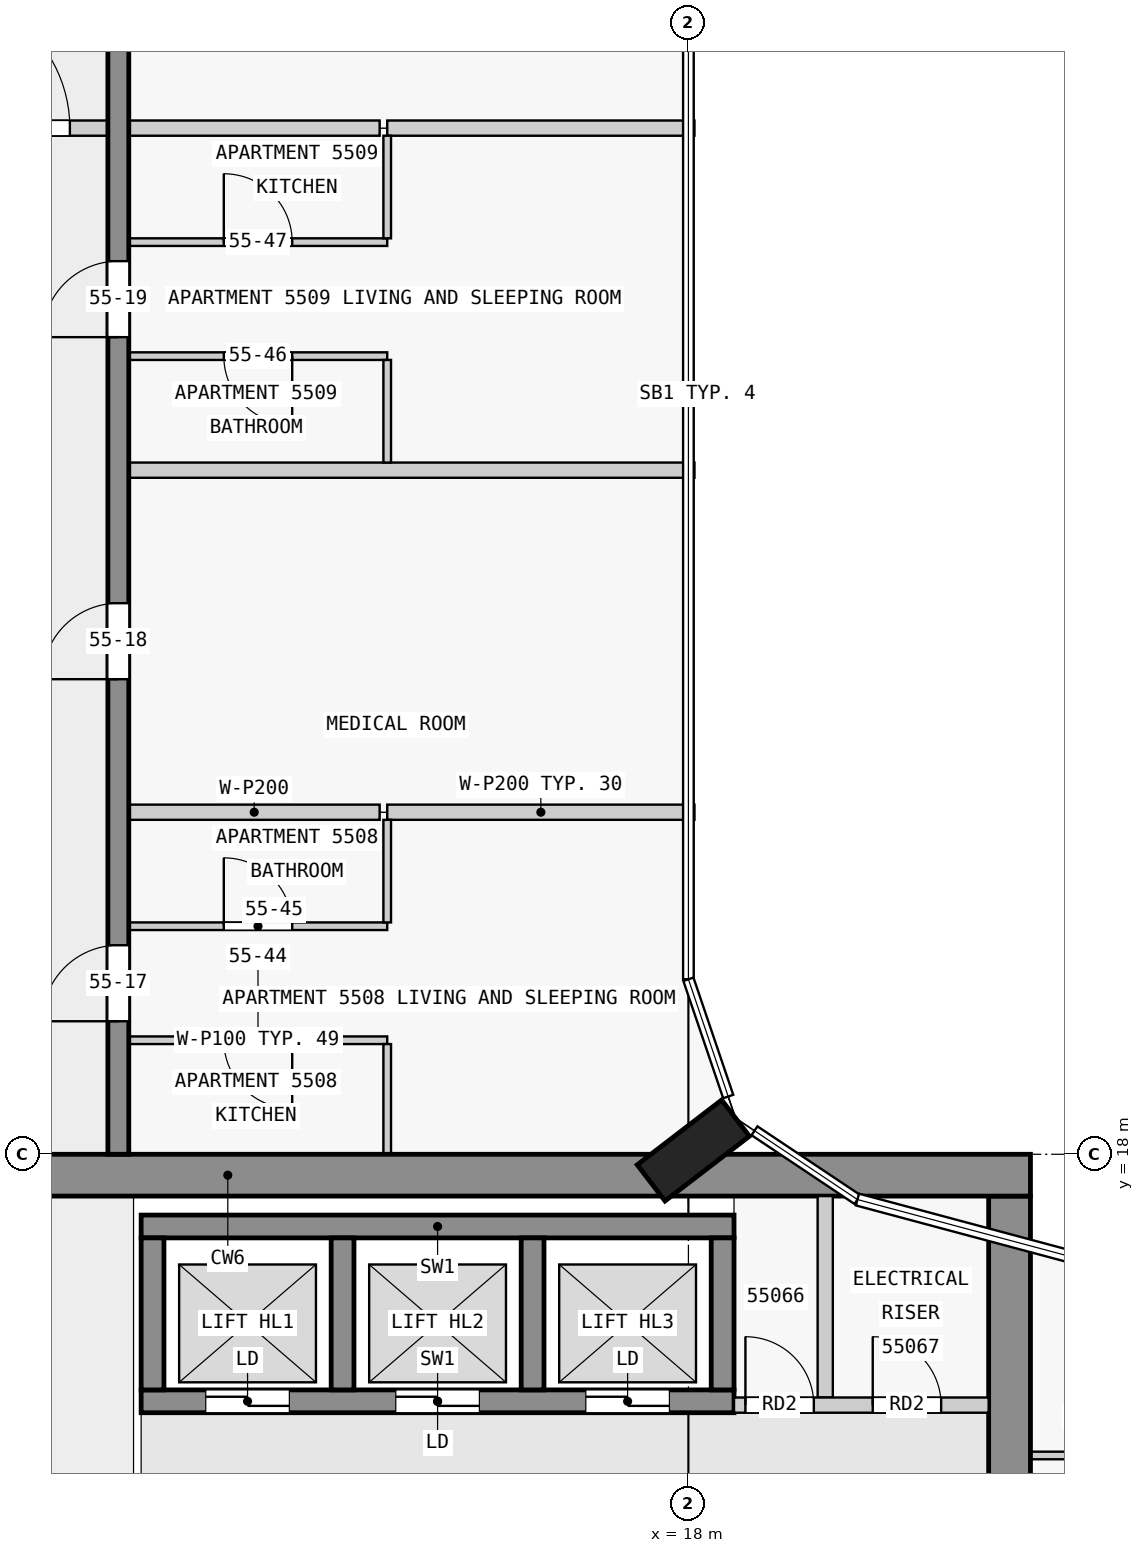
"""IFC4 building model, lengths in metres.
Left out: names, types, materials, properties, quantities, classifications, styles, units other than length and angle.
Written with IfcOpenShell. Run it as: python <this file> out.ifc"""

import sys

from ifc_helpers import new_model, si_unit, direction, frame, frame_2d, origin, origin_2d, place, context, subcontext, project, spatial, rectangle, extrude, element, fill, save


model = new_model("IFC4")
c1 = context("Model", 3, precision=1e-05, world=origin(), true_north=direction((0.0, 1.0)))
c2 = subcontext(c1, "Body", "Model", "MODEL_VIEW")
j1 = project(units=[si_unit("LENGTHUNIT", "METRE"), si_unit("PLANEANGLEUNIT", "RADIAN")], contexts=[c1])
p1 = place(None, origin())
s1 = spatial("IfcSite", under=j1, at=p1, CompositionType="ELEMENT")
p2 = place(p1, origin())
s2 = spatial("IfcBuilding", under=s1, at=p2, CompositionType="ELEMENT")
p3 = place(p2, frame((0.0, 0.0, 211.9)))
s3 = spatial("IfcBuildingStorey", under=s2, at=p3, CompositionType="ELEMENT", Elevation=211.9)
p4 = place(p3, frame((18.065, 18.05, 0.0), z_axis=(0.0, 0.0, 1.0), x_axis=(-0.608810846443, 0.793315418515, 0.0)))
e1 = element("IfcColumn", 1, at=p4, inside=s3, PredefinedType="COLUMN", context=c2, shape_type="SweptSolid", body=[
    extrude(rectangle(XDim=0.6, YDim=1.4, at=origin_2d()), origin(), (0.0, 0.0, 1.0), 3.5),
])
p5 = place(p3, frame((1.38, 17.725, 0.0), z_axis=(0.0, 0.0, 1.0), x_axis=(1.0, 0.0, 0.0)))
e2 = element("IfcWall", 2, at=p5, inside=s3, PredefinedType="SHEAR", context=c2, shape_type="SweptSolid", body=[
    extrude(rectangle(XDim=21.12, YDim=0.55, at=frame_2d((10.56, 0.0))), origin(), (0.0, 0.0, 1.0), 3.25),
])
p6 = place(p5, frame((6.35, 0.0, 0.0)))
e3 = element("IfcOpeningElement", 3, at=p6, cuts=e2, PredefinedType="OPENING", context=c2, shape_type="SweptSolid", body=[
    extrude(rectangle(XDim=1.8, YDim=2.1, at=frame_2d((0.9, 1.05))), frame((0.0, 0.285, 0.0), z_axis=(0.0, -1.0, 0.0), x_axis=(1.0, 0.0, 0.0)), (0.0, 0.0, 1.0), 0.57),
])
p7 = place(p3, frame((22.225, 2.5, 0.0), z_axis=(0.0, 0.0, 1.0), x_axis=(0.0, 1.0, 0.0)))
e4 = element("IfcWall", 4, at=p7, inside=s3, PredefinedType="SHEAR", context=c2, shape_type="SweptSolid", body=[
    extrude(rectangle(XDim=14.95, YDim=0.55, at=frame_2d((7.475, 0.0))), origin(), (0.0, 0.0, 1.0), 3.25),
])
p8 = place(p7, frame((5.6, 0.0, 0.0)))
e5 = element("IfcOpeningElement", 5, at=p8, cuts=e4, PredefinedType="OPENING", context=c2, shape_type="SweptSolid", body=[
    extrude(rectangle(XDim=1.8, YDim=2.1, at=frame_2d((0.9, 1.05))), frame((0.0, 0.285, 0.0), z_axis=(0.0, -1.0, 0.0), x_axis=(1.0, 0.0, 0.0)), (0.0, 0.0, 1.0), 0.57),
])
p9 = place(p3, frame((10.8, 17.05, 0.0), z_axis=(0.0, 0.0, 1.0), x_axis=(1.0, 0.0, 0.0)))
e6 = element("IfcWall", 6, at=p9, inside=s3, PredefinedType="SHEAR", context=c2, shape_type="SweptSolid", body=[
    extrude(rectangle(XDim=7.8, YDim=0.3, at=frame_2d((3.9, 0.0))), origin(), (0.0, 0.0, 1.0), 3.25),
])
p10 = place(p3, frame((10.8, 14.75, 0.0), z_axis=(0.0, 0.0, 1.0), x_axis=(1.0, 0.0, 0.0)))
e7 = element("IfcWall", 7, at=p10, inside=s3, PredefinedType="SHEAR", context=c2, shape_type="SweptSolid", body=[
    extrude(rectangle(XDim=7.8, YDim=0.3, at=frame_2d((3.9, 0.0))), origin(), (0.0, 0.0, 1.0), 3.25),
])
p11 = place(p10, frame((0.85, 0.0, 0.0)))
e8 = element("IfcOpeningElement", 8, at=p11, cuts=e7, PredefinedType="OPENING", context=c2, shape_type="SweptSolid", body=[
    extrude(rectangle(XDim=1.1, YDim=2.1, at=frame_2d((0.55, 1.05))), frame((0.0, 0.16, 0.0), z_axis=(0.0, -1.0, 0.0), x_axis=(1.0, 0.0, 0.0)), (0.0, 0.0, 1.0), 0.32),
])
p12 = place(p10, frame((3.35, 0.0, 0.0)))
e9 = element("IfcOpeningElement", 9, at=p12, cuts=e7, PredefinedType="OPENING", context=c2, shape_type="SweptSolid", body=[
    extrude(rectangle(XDim=1.1, YDim=2.1, at=frame_2d((0.55, 1.05))), frame((0.0, 0.16, 0.0), z_axis=(0.0, -1.0, 0.0), x_axis=(1.0, 0.0, 0.0)), (0.0, 0.0, 1.0), 0.32),
])
p13 = place(p10, frame((5.85, 0.0, 0.0)))
e10 = element("IfcOpeningElement", 10, at=p13, cuts=e7, PredefinedType="OPENING", context=c2, shape_type="SweptSolid", body=[
    extrude(rectangle(XDim=1.1, YDim=2.1, at=frame_2d((0.55, 1.05))), frame((0.0, 0.16, 0.0), z_axis=(0.0, -1.0, 0.0), x_axis=(1.0, 0.0, 0.0)), (0.0, 0.0, 1.0), 0.32),
])
for number, where, z_axis, x_axis in (
    (11, (10.95, 14.9, 0.0), (0.0, 0.0, 1.0), (0.0, 1.0, 0.0)),
    (12, (13.45, 14.9, 0.0), (0.0, 0.0, 1.0), (0.0, 1.0, 0.0)),
    (13, (15.95, 14.9, 0.0), (0.0, 0.0, 1.0), (0.0, 1.0, 0.0)),
    (14, (18.45, 14.9, 0.0), (0.0, 0.0, 1.0), (0.0, 1.0, 0.0)),
):
    element("IfcWall", number, at=place(p3, frame(where, z_axis=z_axis, x_axis=x_axis)), inside=s3, PredefinedType="SHEAR", context=c2, shape_type="SweptSolid", body=[
        extrude(rectangle(XDim=2.0, YDim=0.3, at=frame_2d((1.0, 0.0))), origin(), (0.0, 0.0, 1.0), 3.25),
    ])
p14 = place(p3, frame((10.5, 18.0, 0.0), z_axis=(0.0, 0.0, 1.0), x_axis=(0.0, 1.0, 0.0)))
e15 = element("IfcWall", 15, at=p14, inside=s3, PredefinedType="SHEAR", context=c2, shape_type="SweptSolid", body=[
    extrude(rectangle(XDim=27.0, YDim=0.275, at=frame_2d((13.5, 0.0))), origin(), (0.0, 0.0, 1.0), 3.25),
])
p15 = place(p14, frame((1.75, 0.0, 0.0)))
e16 = element("IfcOpeningElement", 16, at=p15, cuts=e15, PredefinedType="OPENING", context=c2, shape_type="SweptSolid", body=[
    extrude(rectangle(XDim=1.0, YDim=2.1, at=frame_2d((0.5, 1.05))), frame((0.0, 0.147, 0.0), z_axis=(0.0, -1.0, 0.0), x_axis=(1.0, 0.0, 0.0)), (0.0, 0.0, 1.0), 0.295),
])
p16 = place(p14, frame((6.25, 0.0, 0.0)))
e17 = element("IfcOpeningElement", 17, at=p16, cuts=e15, PredefinedType="OPENING", context=c2, shape_type="SweptSolid", body=[
    extrude(rectangle(XDim=1.0, YDim=2.1, at=frame_2d((0.5, 1.05))), frame((0.0, 0.147, 0.0), z_axis=(0.0, -1.0, 0.0), x_axis=(1.0, 0.0, 0.0)), (0.0, 0.0, 1.0), 0.295),
])
p17 = place(p14, frame((10.75, 0.0, 0.0)))
e18 = element("IfcOpeningElement", 18, at=p17, cuts=e15, PredefinedType="OPENING", context=c2, shape_type="SweptSolid", body=[
    extrude(rectangle(XDim=1.0, YDim=2.1, at=frame_2d((0.5, 1.05))), frame((0.0, 0.147, 0.0), z_axis=(0.0, -1.0, 0.0), x_axis=(1.0, 0.0, 0.0)), (0.0, 0.0, 1.0), 0.295),
])
p18 = place(p14, frame((15.25, 0.0, 0.0)))
e19 = element("IfcOpeningElement", 19, at=p18, cuts=e15, PredefinedType="OPENING", context=c2, shape_type="SweptSolid", body=[
    extrude(rectangle(XDim=1.0, YDim=2.1, at=frame_2d((0.5, 1.05))), frame((0.0, 0.147, 0.0), z_axis=(0.0, -1.0, 0.0), x_axis=(1.0, 0.0, 0.0)), (0.0, 0.0, 1.0), 0.295),
])
p19 = place(p14, frame((21.35, 0.0, 0.0)))
e20 = element("IfcOpeningElement", 20, at=p19, cuts=e15, PredefinedType="OPENING", context=c2, shape_type="SweptSolid", body=[
    extrude(rectangle(XDim=1.0, YDim=2.1, at=frame_2d((0.5, 1.05))), frame((0.0, 0.147, 0.0), z_axis=(0.0, -1.0, 0.0), x_axis=(1.0, 0.0, 0.0)), (0.0, 0.0, 1.0), 0.295),
])
p20 = place(p3, frame((18.6, 14.7, 0.0), z_axis=(0.0, 0.0, 1.0), x_axis=(1.0, 0.0, 0.0)))
e21 = element("IfcWall", 21, at=p20, inside=s3, PredefinedType="PARTITIONING", context=c2, shape_type="SweptSolid", body=[
    extrude(rectangle(XDim=3.35, YDim=0.2, at=frame_2d((1.675, 0.0))), origin(), (0.0, 0.0, 1.0), 3.25),
])
p21 = place(p20, frame((0.15, 0.0, 0.0)))
e22 = element("IfcOpeningElement", 22, at=p21, cuts=e21, PredefinedType="OPENING", context=c2, shape_type="SweptSolid", body=[
    extrude(rectangle(XDim=0.9, YDim=2.1, at=frame_2d((0.45, 1.05))), frame((0.0, 0.11, 0.0), z_axis=(0.0, -1.0, 0.0), x_axis=(1.0, 0.0, 0.0)), (0.0, 0.0, 1.0), 0.22),
])
p22 = place(p20, frame((1.825, 0.0, 0.0)))
e23 = element("IfcOpeningElement", 23, at=p22, cuts=e21, PredefinedType="OPENING", context=c2, shape_type="SweptSolid", body=[
    extrude(rectangle(XDim=0.9, YDim=2.1, at=frame_2d((0.45, 1.05))), frame((0.0, 0.11, 0.0), z_axis=(0.0, -1.0, 0.0), x_axis=(1.0, 0.0, 0.0)), (0.0, 0.0, 1.0), 0.22),
])
p23 = place(p3, frame((19.8, 14.8, 0.0), z_axis=(0.0, 0.0, 1.0), x_axis=(0.0, 1.0, 0.0)))
e24 = element("IfcWall", 24, at=p23, inside=s3, PredefinedType="PARTITIONING", context=c2, shape_type="SweptSolid", body=[
    extrude(rectangle(XDim=2.65, YDim=0.2, at=frame_2d((1.325, 0.0))), origin(), (0.0, 0.0, 1.0), 3.25),
])
p24 = place(p3, frame((23.95, 14.038, 0.0), z_axis=(0.0, 0.0, 1.0), x_axis=(-1.0, 0.0, 0.0)))
e25 = element("IfcWall", 25, at=p24, inside=s3, PredefinedType="PARTITIONING", context=c2, shape_type="SweptSolid", body=[
    extrude(rectangle(XDim=1.45, YDim=0.1, at=frame_2d((0.725, 0.0))), origin(), (0.0, 0.0, 1.0), 3.25),
])
p25 = place(p3, frame((14.038, 19.5, 0.0), z_axis=(0.0, 0.0, 1.0), x_axis=(-1.0, 0.0, 0.0)))
e26 = element("IfcWall", 26, at=p25, inside=s3, PredefinedType="PARTITIONING", context=c2, shape_type="SweptSolid", body=[
    extrude(rectangle(XDim=3.4, YDim=0.1, at=frame_2d((1.7, 0.0))), origin(), (0.0, 0.0, 1.0), 3.25),
])
p26 = place(p25, frame((1.25, 0.0, 0.0)))
e27 = element("IfcOpeningElement", 27, at=p26, cuts=e26, PredefinedType="OPENING", context=c2, shape_type="SweptSolid", body=[
    extrude(rectangle(XDim=0.9, YDim=2.1, at=frame_2d((0.45, 1.05))), frame((0.0, 0.06, 0.0), z_axis=(0.0, -1.0, 0.0), x_axis=(1.0, 0.0, 0.0)), (0.0, 0.0, 1.0), 0.12),
])
p27 = place(p3, frame((10.637, 21.0, 0.0), z_axis=(0.0, 0.0, 1.0), x_axis=(1.0, 0.0, 0.0)))
e28 = element("IfcWall", 28, at=p27, inside=s3, PredefinedType="PARTITIONING", context=c2, shape_type="SweptSolid", body=[
    extrude(rectangle(XDim=3.4, YDim=0.1, at=frame_2d((1.7, 0.0))), origin(), (0.0, 0.0, 1.0), 3.25),
])
p28 = place(p27, frame((1.25, 0.0, 0.0)))
e29 = element("IfcOpeningElement", 29, at=p28, cuts=e28, PredefinedType="OPENING", context=c2, shape_type="SweptSolid", body=[
    extrude(rectangle(XDim=0.9, YDim=2.1, at=frame_2d((0.45, 1.05))), frame((0.0, 0.06, 0.0), z_axis=(0.0, -1.0, 0.0), x_axis=(1.0, 0.0, 0.0)), (0.0, 0.0, 1.0), 0.12),
])
p29 = place(p3, frame((13.938, 22.5, 0.0), z_axis=(0.0, 0.0, 1.0), x_axis=(-1.0, 0.0, 0.0)))
e30 = element("IfcWall", 30, at=p29, inside=s3, PredefinedType="PARTITIONING", context=c2, shape_type="SweptSolid", body=[
    extrude(rectangle(XDim=3.3, YDim=0.2, at=frame_2d((1.65, 0.0))), origin(), (0.0, 0.0, 1.0), 3.25),
])
p30 = place(p3, frame((14.038, 22.5, 0.0), z_axis=(0.0, 0.0, 1.0), x_axis=(1.0, 0.0, 0.0)))
e31 = element("IfcWall", 31, at=p30, inside=s3, PredefinedType="PARTITIONING", context=c2, shape_type="SweptSolid", body=[
    extrude(rectangle(XDim=4.042, YDim=0.2, at=frame_2d((2.021, 0.0))), origin(), (0.0, 0.0, 1.0), 3.25),
])
p31 = place(p3, frame((18.08, 27.0, 0.0), z_axis=(0.0, 0.0, 1.0), x_axis=(-1.0, 0.0, 0.0)))
e32 = element("IfcWall", 32, at=p31, inside=s3, PredefinedType="PARTITIONING", context=c2, shape_type="SweptSolid", body=[
    extrude(rectangle(XDim=7.443, YDim=0.2, at=frame_2d((3.721, 0.0))), origin(), (0.0, 0.0, 1.0), 3.25),
])
p32 = place(p3, frame((14.038, 28.5, 0.0), z_axis=(0.0, 0.0, 1.0), x_axis=(-1.0, 0.0, 0.0)))
e33 = element("IfcWall", 33, at=p32, inside=s3, PredefinedType="PARTITIONING", context=c2, shape_type="SweptSolid", body=[
    extrude(rectangle(XDim=3.4, YDim=0.1, at=frame_2d((1.7, 0.0))), origin(), (0.0, 0.0, 1.0), 3.25),
])
p33 = place(p32, frame((1.25, 0.0, 0.0)))
e34 = element("IfcOpeningElement", 34, at=p33, cuts=e33, PredefinedType="OPENING", context=c2, shape_type="SweptSolid", body=[
    extrude(rectangle(XDim=0.9, YDim=2.1, at=frame_2d((0.45, 1.05))), frame((0.0, 0.06, 0.0), z_axis=(0.0, -1.0, 0.0), x_axis=(1.0, 0.0, 0.0)), (0.0, 0.0, 1.0), 0.12),
])
p34 = place(p3, frame((10.637, 30.0, 0.0), z_axis=(0.0, 0.0, 1.0), x_axis=(1.0, 0.0, 0.0)))
e35 = element("IfcWall", 35, at=p34, inside=s3, PredefinedType="PARTITIONING", context=c2, shape_type="SweptSolid", body=[
    extrude(rectangle(XDim=3.4, YDim=0.1, at=frame_2d((1.7, 0.0))), origin(), (0.0, 0.0, 1.0), 3.25),
])
p35 = place(p34, frame((1.25, 0.0, 0.0)))
e36 = element("IfcOpeningElement", 36, at=p35, cuts=e35, PredefinedType="OPENING", context=c2, shape_type="SweptSolid", body=[
    extrude(rectangle(XDim=0.9, YDim=2.1, at=frame_2d((0.45, 1.05))), frame((0.0, 0.06, 0.0), z_axis=(0.0, -1.0, 0.0), x_axis=(1.0, 0.0, 0.0)), (0.0, 0.0, 1.0), 0.12),
])
p36 = place(p3, frame((13.938, 31.5, 0.0), z_axis=(0.0, 0.0, 1.0), x_axis=(-1.0, 0.0, 0.0)))
e37 = element("IfcWall", 37, at=p36, inside=s3, PredefinedType="PARTITIONING", context=c2, shape_type="SweptSolid", body=[
    extrude(rectangle(XDim=3.3, YDim=0.2, at=frame_2d((1.65, 0.0))), origin(), (0.0, 0.0, 1.0), 3.25),
])
p37 = place(p3, frame((14.038, 31.5, 0.0), z_axis=(0.0, 0.0, 1.0), x_axis=(1.0, 0.0, 0.0)))
e38 = element("IfcWall", 38, at=p37, inside=s3, PredefinedType="PARTITIONING", context=c2, shape_type="SweptSolid", body=[
    extrude(rectangle(XDim=4.042, YDim=0.2, at=frame_2d((2.021, 0.0))), origin(), (0.0, 0.0, 1.0), 3.25),
])
p38 = place(p3, frame((14.038, 18.0, 0.0), z_axis=(0.0, 0.0, 1.0), x_axis=(0.0, 1.0, 0.0)))
e39 = element("IfcWall", 39, at=p38, inside=s3, PredefinedType="PARTITIONING", context=c2, shape_type="SweptSolid", body=[
    extrude(rectangle(XDim=1.45, YDim=0.1, at=frame_2d((0.725, 0.0))), origin(), (0.0, 0.0, 1.0), 3.25),
])
for number, where, z_axis, x_axis in (
    (40, (14.038, 21.05, 0.0), (0.0, 0.0, 1.0), (0.0, 1.0, 0.0)),
    (41, (14.038, 27.1, 0.0), (0.0, 0.0, 1.0), (0.0, 1.0, 0.0)),
    (42, (14.038, 30.05, 0.0), (0.0, 0.0, 1.0), (0.0, 1.0, 0.0)),
):
    element("IfcWall", number, at=place(p3, frame(where, z_axis=z_axis, x_axis=x_axis)), inside=s3, PredefinedType="PARTITIONING", context=c2, shape_type="SweptSolid", body=[
        extrude(rectangle(XDim=1.35, YDim=0.1, at=frame_2d((0.675, 0.0))), origin(), (0.0, 0.0, 1.0), 3.25),
    ])
p39 = place(p3, frame((7.462, 31.5, 0.0), z_axis=(0.0, 0.0, 1.0), x_axis=(1.0, 0.0, 0.0)))
e43 = element("IfcWall", 43, at=p39, inside=s3, PredefinedType="PARTITIONING", context=c2, shape_type="SweptSolid", body=[
    extrude(rectangle(XDim=3.075, YDim=0.2, at=frame_2d((1.538, 0.0))), origin(), (0.0, 0.0, 1.0), 3.25),
])
p40 = place(p39, frame((0.6, 0.0, 0.0)))
e44 = element("IfcOpeningElement", 44, at=p40, cuts=e43, PredefinedType="OPENING", context=c2, shape_type="SweptSolid", body=[
    extrude(rectangle(XDim=1.8, YDim=2.1, at=frame_2d((0.9, 1.05))), frame((0.0, 0.11, 0.0), z_axis=(0.0, -1.0, 0.0), x_axis=(1.0, 0.0, 0.0)), (0.0, 0.0, 1.0), 0.22),
])
p41 = place(p11, origin())
e45 = element("IfcDoor", 45, at=p41, inside=s3, OperationType="DOUBLE_DOOR_SLIDING", PredefinedType="DOOR", context=c2, shape_type="SweptSolid", body=[
    extrude(rectangle(XDim=1.1, YDim=2.1, at=frame_2d((0.55, 1.05))), frame((0.0, 0.025, 0.0), z_axis=(0.0, -1.0, 0.0), x_axis=(1.0, 0.0, 0.0)), (0.0, 0.0, 1.0), 0.05),
])
fill(e8, e45)
p42 = place(p12, origin())
e46 = element("IfcDoor", 46, at=p42, inside=s3, OperationType="DOUBLE_DOOR_SLIDING", PredefinedType="DOOR", context=c2, shape_type="SweptSolid", body=[
    extrude(rectangle(XDim=1.1, YDim=2.1, at=frame_2d((0.55, 1.05))), frame((0.0, 0.025, 0.0), z_axis=(0.0, -1.0, 0.0), x_axis=(1.0, 0.0, 0.0)), (0.0, 0.0, 1.0), 0.05),
])
fill(e9, e46)
p43 = place(p13, origin())
e47 = element("IfcDoor", 47, at=p43, inside=s3, OperationType="DOUBLE_DOOR_SLIDING", PredefinedType="DOOR", context=c2, shape_type="SweptSolid", body=[
    extrude(rectangle(XDim=1.1, YDim=2.1, at=frame_2d((0.55, 1.05))), frame((0.0, 0.025, 0.0), z_axis=(0.0, -1.0, 0.0), x_axis=(1.0, 0.0, 0.0)), (0.0, 0.0, 1.0), 0.05),
])
fill(e10, e47)
p44 = place(p21, origin())
e48 = element("IfcDoor", 48, at=p44, inside=s3, OperationType="SINGLE_SWING_LEFT", PredefinedType="DOOR", context=c2, shape_type="SweptSolid", body=[
    extrude(rectangle(XDim=0.9, YDim=2.1, at=frame_2d((0.45, 1.05))), frame((0.0, 0.025, 0.0), z_axis=(0.0, -1.0, 0.0), x_axis=(1.0, 0.0, 0.0)), (0.0, 0.0, 1.0), 0.05),
])
fill(e22, e48)
p45 = place(p22, origin())
e49 = element("IfcDoor", 49, at=p45, inside=s3, OperationType="SINGLE_SWING_LEFT", PredefinedType="DOOR", context=c2, shape_type="SweptSolid", body=[
    extrude(rectangle(XDim=0.9, YDim=2.1, at=frame_2d((0.45, 1.05))), frame((0.0, 0.025, 0.0), z_axis=(0.0, -1.0, 0.0), x_axis=(1.0, 0.0, 0.0)), (0.0, 0.0, 1.0), 0.05),
])
fill(e23, e49)
p46 = place(p15, origin())
e50 = element("IfcDoor", 50, at=p46, inside=s3, OperationType="SINGLE_SWING_LEFT", PredefinedType="DOOR", context=c2, shape_type="SweptSolid", body=[
    extrude(rectangle(XDim=1.0, YDim=2.1, at=frame_2d((0.5, 1.05))), frame((0.0, 0.025, 0.0), z_axis=(0.0, -1.0, 0.0), x_axis=(1.0, 0.0, 0.0)), (0.0, 0.0, 1.0), 0.05),
])
fill(e16, e50)
p47 = place(p16, origin())
e51 = element("IfcDoor", 51, at=p47, inside=s3, OperationType="SINGLE_SWING_LEFT", PredefinedType="DOOR", context=c2, shape_type="SweptSolid", body=[
    extrude(rectangle(XDim=1.0, YDim=2.1, at=frame_2d((0.5, 1.05))), frame((0.0, 0.025, 0.0), z_axis=(0.0, -1.0, 0.0), x_axis=(1.0, 0.0, 0.0)), (0.0, 0.0, 1.0), 0.05),
])
fill(e17, e51)
p48 = place(p17, origin())
e52 = element("IfcDoor", 52, at=p48, inside=s3, OperationType="SINGLE_SWING_LEFT", PredefinedType="DOOR", context=c2, shape_type="SweptSolid", body=[
    extrude(rectangle(XDim=1.0, YDim=2.1, at=frame_2d((0.5, 1.05))), frame((0.0, 0.025, 0.0), z_axis=(0.0, -1.0, 0.0), x_axis=(1.0, 0.0, 0.0)), (0.0, 0.0, 1.0), 0.05),
])
fill(e18, e52)
p49 = place(p40, origin())
e53 = element("IfcDoor", 53, at=p49, inside=s3, OperationType="SINGLE_SWING_LEFT", PredefinedType="DOOR", context=c2, shape_type="SweptSolid", body=[
    extrude(rectangle(XDim=1.8, YDim=2.1, at=frame_2d((0.9, 1.05))), frame((0.0, 0.025, 0.0), z_axis=(0.0, -1.0, 0.0), x_axis=(1.0, 0.0, 0.0)), (0.0, 0.0, 1.0), 0.05),
])
fill(e44, e53)
p50 = place(p26, origin())
e54 = element("IfcDoor", 54, at=p50, inside=s3, OperationType="SINGLE_SWING_LEFT", PredefinedType="DOOR", context=c2, shape_type="SweptSolid", body=[
    extrude(rectangle(XDim=0.9, YDim=2.1, at=frame_2d((0.45, 1.05))), frame((0.0, 0.025, 0.0), z_axis=(0.0, -1.0, 0.0), x_axis=(1.0, 0.0, 0.0)), (0.0, 0.0, 1.0), 0.05),
])
fill(e27, e54)
p51 = place(p28, origin())
e55 = element("IfcDoor", 55, at=p51, inside=s3, OperationType="SINGLE_SWING_LEFT", PredefinedType="DOOR", context=c2, shape_type="SweptSolid", body=[
    extrude(rectangle(XDim=0.9, YDim=2.1, at=frame_2d((0.45, 1.05))), frame((0.0, 0.025, 0.0), z_axis=(0.0, -1.0, 0.0), x_axis=(1.0, 0.0, 0.0)), (0.0, 0.0, 1.0), 0.05),
])
fill(e29, e55)
p52 = place(p33, origin())
e56 = element("IfcDoor", 56, at=p52, inside=s3, OperationType="SINGLE_SWING_LEFT", PredefinedType="DOOR", context=c2, shape_type="SweptSolid", body=[
    extrude(rectangle(XDim=0.9, YDim=2.1, at=frame_2d((0.45, 1.05))), frame((0.0, 0.025, 0.0), z_axis=(0.0, -1.0, 0.0), x_axis=(1.0, 0.0, 0.0)), (0.0, 0.0, 1.0), 0.05),
])
fill(e34, e56)
p53 = place(p35, origin())
e57 = element("IfcDoor", 57, at=p53, inside=s3, OperationType="SINGLE_SWING_LEFT", PredefinedType="DOOR", context=c2, shape_type="SweptSolid", body=[
    extrude(rectangle(XDim=0.9, YDim=2.1, at=frame_2d((0.45, 1.05))), frame((0.0, 0.025, 0.0), z_axis=(0.0, -1.0, 0.0), x_axis=(1.0, 0.0, 0.0)), (0.0, 0.0, 1.0), 0.05),
])
fill(e36, e57)
save(model, sys.argv[1])
